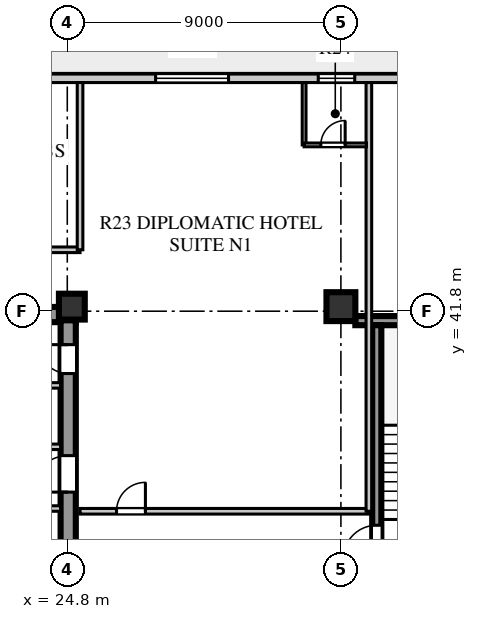
"""IFC4 building model, lengths in metres.
Left out: names, types, materials, properties, quantities, classifications, styles, units other than length and angle.
Written with IfcOpenShell. Run it as: python <this file> out.ifc"""

import sys

from ifc_helpers import new_model, si_unit, direction, frame, frame_2d, origin, origin_2d, place, context, subcontext, project, spatial, rectangle, extrude, element, fill, save


model = new_model("IFC4")
c1 = context("Model", 3, precision=1e-05, world=origin(), true_north=direction((0.0, 1.0)))
c2 = subcontext(c1, "Body", "Model", "MODEL_VIEW")
j1 = project(units=[si_unit("LENGTHUNIT", "METRE"), si_unit("PLANEANGLEUNIT", "RADIAN")], contexts=[c1])
p1 = place(None, origin())
s1 = spatial("IfcSite", under=j1, at=p1, CompositionType="ELEMENT")
p2 = place(p1, origin())
s2 = spatial("IfcBuilding", under=s1, at=p2, CompositionType="ELEMENT")
p3 = place(p2, frame((0.0, 0.0, 157.9)))
s3 = spatial("IfcBuildingStorey", under=s2, at=p3, CompositionType="ELEMENT", Elevation=157.9)
p4 = place(p3, frame((15.4, 41.69, 0.0), z_axis=(0.0, 0.0, 1.0), x_axis=(1.0, 0.0, 0.0)))
e1 = element("IfcWall", 1, at=p4, inside=s3, PredefinedType="SHEAR", context=c2, shape_type="SweptSolid", body=[
    extrude(rectangle(XDim=9.68, YDim=0.5, at=frame_2d((4.84, 0.0))), origin(), (0.0, 0.0, 1.0), 3.6),
])
p5 = place(p3, frame((24.83, 15.74, 0.0), z_axis=(0.0, 0.0, 1.0), x_axis=(0.0, 1.0, 0.0)))
e2 = element("IfcWall", 2, at=p5, inside=s3, PredefinedType="SHEAR", context=c2, shape_type="SweptSolid", body=[
    extrude(rectangle(XDim=25.76, YDim=0.5, at=frame_2d((12.88, 0.0))), origin(), (0.0, 0.0, 1.0), 3.6),
])
p6 = place(p5, frame((1.61, 0.0, 0.0)))
e3 = element("IfcOpeningElement", 3, at=p6, cuts=e2, PredefinedType="OPENING", context=c2, shape_type="SweptSolid", body=[
    extrude(rectangle(XDim=1.2, YDim=2.1, at=frame_2d((0.6, 1.05))), frame((0.0, 0.26, 0.0), z_axis=(0.0, -1.0, 0.0), x_axis=(1.0, 0.0, 0.0)), (0.0, 0.0, 1.0), 0.52),
])
p7 = place(p5, frame((6.78, 0.0, 0.0)))
e4 = element("IfcOpeningElement", 4, at=p7, cuts=e2, PredefinedType="OPENING", context=c2, shape_type="SweptSolid", body=[
    extrude(rectangle(XDim=0.85, YDim=2.06, at=frame_2d((0.425, 1.03))), frame((0.0, 0.26, 0.0), z_axis=(0.0, -1.0, 0.0), x_axis=(1.0, 0.0, 0.0)), (0.0, 0.0, 1.0), 0.52),
])
p8 = place(p5, frame((12.11, 0.0, 0.0)))
e5 = element("IfcOpeningElement", 5, at=p8, cuts=e2, PredefinedType="OPENING", context=c2, shape_type="SweptSolid", body=[
    extrude(rectangle(XDim=1.5, YDim=2.12, at=frame_2d((0.75, 1.06))), frame((0.0, 0.26, 0.0), z_axis=(0.0, -1.0, 0.0), x_axis=(1.0, 0.0, 0.0)), (0.0, 0.0, 1.0), 0.52),
])
p9 = place(p5, frame((20.11, 0.0, 0.0)))
e6 = element("IfcOpeningElement", 6, at=p9, cuts=e2, PredefinedType="OPENING", context=c2, shape_type="SweptSolid", body=[
    extrude(rectangle(XDim=1.2, YDim=2.12, at=frame_2d((0.6, 1.06))), frame((0.0, 0.26, 0.0), z_axis=(0.0, -1.0, 0.0), x_axis=(1.0, 0.0, 0.0)), (0.0, 0.0, 1.0), 0.52),
])
p10 = place(p5, frame((24.01, 0.0, 0.0)))
e7 = element("IfcOpeningElement", 7, at=p10, cuts=e2, PredefinedType="OPENING", context=c2, shape_type="SweptSolid", body=[
    extrude(rectangle(XDim=0.95, YDim=2.1, at=frame_2d((0.475, 1.05))), frame((0.0, 0.26, 0.0), z_axis=(0.0, -1.0, 0.0), x_axis=(1.0, 0.0, 0.0)), (0.0, 0.0, 1.0), 0.52),
])
p11 = place(p3, frame((34.275, 41.49, 0.0), z_axis=(0.0, 0.0, 1.0), x_axis=(1.0, 0.0, 0.0)))
e8 = element("IfcWall", 8, at=p11, inside=s3, PredefinedType="SHEAR", context=c2, shape_type="SweptSolid", body=[
    extrude(rectangle(XDim=4.595, YDim=0.3, at=frame_2d((2.298, 0.0))), origin(), (0.0, 0.0, 1.0), 3.6),
])
p12 = place(p3, frame((34.98, 33.31, 0.0), z_axis=(0.0, 0.0, 1.0), x_axis=(0.0, 1.0, 0.0)))
e9 = element("IfcWall", 9, at=p12, inside=s3, PredefinedType="SHEAR", context=c2, shape_type="SweptSolid", body=[
    extrude(rectangle(XDim=8.03, YDim=0.3, at=frame_2d((4.015, 0.0))), origin(), (0.0, 0.0, 1.0), 3.6),
])
p13 = place(p12, frame((0.35, 0.0, 0.0)))
e10 = element("IfcOpeningElement", 10, at=p13, cuts=e9, PredefinedType="OPENING", context=c2, shape_type="SweptSolid", body=[
    extrude(rectangle(XDim=1.1, YDim=2.1, at=frame_2d((0.55, 1.05))), frame((0.0, 0.16, 0.0), z_axis=(0.0, -1.0, 0.0), x_axis=(1.0, 0.0, 0.0)), (0.0, 0.0, 1.0), 0.32),
])
p14 = place(p3, frame((24.95, 41.95, 0.0), z_axis=(0.0, 0.0, 1.0), x_axis=(1.0, 0.0, 0.0)))
e11 = element("IfcColumn", 11, at=p14, inside=s3, PredefinedType="COLUMN", context=c2, shape_type="SweptSolid", body=[
    extrude(rectangle(XDim=0.85, YDim=0.85, at=origin_2d()), origin(), (0.0, 0.0, 1.0), 3.6),
])
p15 = place(p3, frame((33.8, 41.95, 0.0), z_axis=(0.0, 0.0, 1.0), x_axis=(1.0, 0.0, 0.0)))
e12 = element("IfcColumn", 12, at=p15, inside=s3, PredefinedType="COLUMN", context=c2, shape_type="SweptSolid", body=[
    extrude(rectangle(XDim=0.95, YDim=0.95, at=origin_2d()), origin(), (0.0, 0.0, 1.0), 3.6),
])
p16 = place(p3, frame((45.55, 49.46, 0.0), z_axis=(0.0, 0.0, 1.0), x_axis=(-1.0, 0.0, 0.0)))
e13 = element("IfcWall", 13, at=p16, inside=s3, PredefinedType="STANDARD", context=c2, shape_type="SweptSolid", body=[
    extrude(rectangle(XDim=32.5, YDim=0.28, at=frame_2d((16.25, 0.0))), origin(), (0.0, 0.0, 1.0), 3.6),
])
p17 = place(p16, frame((30.55, 0.0, 0.0)))
e14 = element("IfcOpeningElement", 14, at=p17, cuts=e13, PredefinedType="OPENING", context=c2, shape_type="SweptSolid", body=[
    extrude(rectangle(XDim=1.0, YDim=2.05, at=frame_2d((0.5, 1.025))), frame((0.0, 0.15, 0.0), z_axis=(0.0, -1.0, 0.0), x_axis=(1.0, 0.0, 0.0)), (0.0, 0.0, 1.0), 0.3),
])
p18 = place(p16, frame((24.87, 0.0, 0.8)))
e15 = element("IfcOpeningElement", 15, at=p18, cuts=e13, PredefinedType="OPENING", context=c2, shape_type="SweptSolid", body=[
    extrude(rectangle(XDim=1.2, YDim=1.75, at=frame_2d((0.6, 0.875))), frame((0.0, 0.15, 0.0), z_axis=(0.0, -1.0, 0.0), x_axis=(1.0, 0.0, 0.0)), (0.0, 0.0, 1.0), 0.3),
])
p19 = place(p16, frame((15.445, 0.0, 0.8)))
e16 = element("IfcOpeningElement", 16, at=p19, cuts=e13, PredefinedType="OPENING", context=c2, shape_type="SweptSolid", body=[
    extrude(rectangle(XDim=2.4, YDim=2.05, at=frame_2d((1.2, 1.025))), frame((0.0, 0.15, 0.0), z_axis=(0.0, -1.0, 0.0), x_axis=(1.0, 0.0, 0.0)), (0.0, 0.0, 1.0), 0.3),
])
p20 = place(p16, frame((11.295, 0.0, 0.8)))
e17 = element("IfcOpeningElement", 17, at=p20, cuts=e13, PredefinedType="OPENING", context=c2, shape_type="SweptSolid", body=[
    extrude(rectangle(XDim=1.2, YDim=1.75, at=frame_2d((0.6, 0.875))), frame((0.0, 0.15, 0.0), z_axis=(0.0, -1.0, 0.0), x_axis=(1.0, 0.0, 0.0)), (0.0, 0.0, 1.0), 0.3),
])
p21 = place(p16, frame((7.105, 0.0, 0.8)))
e18 = element("IfcOpeningElement", 18, at=p21, cuts=e13, PredefinedType="OPENING", context=c2, shape_type="SweptSolid", body=[
    extrude(rectangle(XDim=1.35, YDim=1.9, at=frame_2d((0.675, 0.95))), frame((0.0, 0.15, 0.0), z_axis=(0.0, -1.0, 0.0), x_axis=(1.0, 0.0, 0.0)), (0.0, 0.0, 1.0), 0.3),
])
p22 = place(p16, frame((1.595, 0.0, 0.8)))
e19 = element("IfcOpeningElement", 19, at=p22, cuts=e13, PredefinedType="OPENING", context=c2, shape_type="SweptSolid", body=[
    extrude(rectangle(XDim=1.65, YDim=1.95, at=frame_2d((0.825, 0.975))), frame((0.0, 0.15, 0.0), z_axis=(0.0, -1.0, 0.0), x_axis=(1.0, 0.0, 0.0)), (0.0, 0.0, 1.0), 0.3),
])
p23 = place(p3, frame((22.02, 35.31, 0.0), z_axis=(0.0, 0.0, 1.0), x_axis=(1.0, 0.0, 0.0)))
e20 = element("IfcWall", 20, at=p23, inside=s3, PredefinedType="SOLIDWALL", context=c2, shape_type="SweptSolid", body=[
    extrude(rectangle(XDim=2.56, YDim=0.18, at=frame_2d((1.28, 0.0))), origin(), (0.0, 0.0, 1.0), 3.6),
])
p24 = place(p23, frame((0.55, 0.0, 0.0)))
e21 = element("IfcOpeningElement", 21, at=p24, cuts=e20, PredefinedType="OPENING", context=c2, shape_type="SweptSolid", body=[
    extrude(rectangle(XDim=1.0, YDim=2.1, at=frame_2d((0.5, 1.05))), frame((0.0, 0.1, 0.0), z_axis=(0.0, -1.0, 0.0), x_axis=(1.0, 0.0, 0.0)), (0.0, 0.0, 1.0), 0.2),
])
p25 = place(p3, frame((19.64, 37.34, 0.0), z_axis=(0.0, 0.0, 1.0), x_axis=(1.0, 0.0, 0.0)))
e22 = element("IfcWall", 22, at=p25, inside=s3, PredefinedType="SOLIDWALL", context=c2, shape_type="SweptSolid", body=[
    extrude(rectangle(XDim=4.94, YDim=0.18, at=frame_2d((2.47, 0.0))), origin(), (0.0, 0.0, 1.0), 3.6),
])
p26 = place(p25, frame((0.45, 0.0, 0.0)))
e23 = element("IfcOpeningElement", 23, at=p26, cuts=e22, PredefinedType="OPENING", context=c2, shape_type="SweptSolid", body=[
    extrude(rectangle(XDim=1.0, YDim=2.1, at=frame_2d((0.5, 1.05))), frame((0.0, 0.1, 0.0), z_axis=(0.0, -1.0, 0.0), x_axis=(1.0, 0.0, 0.0)), (0.0, 0.0, 1.0), 0.2),
])
p27 = place(p25, frame((2.5, 0.0, 0.0)))
e24 = element("IfcOpeningElement", 24, at=p27, cuts=e22, PredefinedType="OPENING", context=c2, shape_type="SweptSolid", body=[
    extrude(rectangle(XDim=1.0, YDim=2.1, at=frame_2d((0.5, 1.05))), frame((0.0, 0.1, 0.0), z_axis=(0.0, -1.0, 0.0), x_axis=(1.0, 0.0, 0.0)), (0.0, 0.0, 1.0), 0.2),
])
p28 = place(p3, frame((19.64, 39.36, 0.0), z_axis=(0.0, 0.0, 1.0), x_axis=(1.0, 0.0, 0.0)))
e25 = element("IfcWall", 25, at=p28, inside=s3, PredefinedType="SOLIDWALL", context=c2, shape_type="SweptSolid", body=[
    extrude(rectangle(XDim=4.94, YDim=0.18, at=frame_2d((2.47, 0.0))), origin(), (0.0, 0.0, 1.0), 3.6),
])
p29 = place(p3, frame((25.22, 35.22, 0.0), z_axis=(0.0, 0.0, 1.0), x_axis=(1.0, 0.0, 0.0)))
e26 = element("IfcWall", 26, at=p29, inside=s3, PredefinedType="SOLIDWALL", context=c2, shape_type="SweptSolid", body=[
    extrude(rectangle(XDim=9.5, YDim=0.185, at=frame_2d((4.75, 0.0))), origin(), (0.0, 0.0, 1.0), 3.6),
])
p30 = place(p29, frame((1.2, 0.0, 0.0)))
e27 = element("IfcOpeningElement", 27, at=p30, cuts=e26, PredefinedType="OPENING", context=c2, shape_type="SweptSolid", body=[
    extrude(rectangle(XDim=0.95, YDim=2.1, at=frame_2d((0.475, 1.05))), frame((0.0, 0.103, 0.0), z_axis=(0.0, -1.0, 0.0), x_axis=(1.0, 0.0, 0.0)), (0.0, 0.0, 1.0), 0.205),
])
p31 = place(p3, frame((13.39, 43.82, 0.0), z_axis=(0.0, 0.0, 1.0), x_axis=(1.0, 0.0, 0.0)))
e28 = element("IfcWall", 28, at=p31, inside=s3, PredefinedType="SOLIDWALL", context=c2, shape_type="SweptSolid", body=[
    extrude(rectangle(XDim=11.83, YDim=0.185, at=frame_2d((5.915, 0.0))), origin(), (0.0, 0.0, 1.0), 3.6),
])
p32 = place(p31, frame((4.76, 0.0, 0.0)))
e29 = element("IfcOpeningElement", 29, at=p32, cuts=e28, PredefinedType="OPENING", context=c2, shape_type="SweptSolid", body=[
    extrude(rectangle(XDim=1.0, YDim=2.08, at=frame_2d((0.5, 1.04))), frame((0.0, 0.103, 0.0), z_axis=(0.0, -1.0, 0.0), x_axis=(1.0, 0.0, 0.0)), (0.0, 0.0, 1.0), 0.205),
])
p33 = place(p3, frame((25.22, 43.82, 0.0), z_axis=(0.0, 0.0, 1.0), x_axis=(0.0, 1.0, 0.0)))
e30 = element("IfcWall", 30, at=p33, inside=s3, PredefinedType="SOLIDWALL", context=c2, shape_type="SweptSolid", body=[
    extrude(rectangle(XDim=5.5, YDim=0.185, at=frame_2d((2.75, 0.0))), origin(), (0.0, 0.0, 1.0), 3.15),
])
p34 = place(p3, frame((34.72, 35.22, 0.0), z_axis=(0.0, 0.0, 1.0), x_axis=(0.0, 1.0, 0.0)))
e31 = element("IfcWall", 31, at=p34, inside=s3, PredefinedType="SOLIDWALL", context=c2, shape_type="SweptSolid", body=[
    extrude(rectangle(XDim=14.1, YDim=0.185, at=frame_2d((7.05, 0.0))), origin(), (0.0, 0.0, 1.0), 3.6),
])
p35 = place(p3, frame((32.59, 47.27, 0.0), z_axis=(0.0, 0.0, 1.0), x_axis=(0.0, 1.0, 0.0)))
e32 = element("IfcWall", 32, at=p35, inside=s3, PredefinedType="PLUMBINGWALL", context=c2, shape_type="SweptSolid", body=[
    extrude(rectangle(XDim=2.05, YDim=0.125, at=frame_2d((1.025, 0.0))), origin(), (0.0, 0.0, 1.0), 3.6),
])
p36 = place(p3, frame((32.59, 47.27, 0.0), z_axis=(0.0, 0.0, 1.0), x_axis=(1.0, 0.0, 0.0)))
e33 = element("IfcWall", 33, at=p36, inside=s3, PredefinedType="PLUMBINGWALL", context=c2, shape_type="SweptSolid", body=[
    extrude(rectangle(XDim=2.05, YDim=0.125, at=frame_2d((1.025, 0.0))), origin(), (0.0, 0.0, 1.0), 3.6),
])
p37 = place(p36, frame((0.55, 0.0, 0.0)))
e34 = element("IfcOpeningElement", 34, at=p37, cuts=e33, PredefinedType="OPENING", context=c2, shape_type="SweptSolid", body=[
    extrude(rectangle(XDim=0.8, YDim=2.05, at=frame_2d((0.4, 1.025))), frame((0.0, 0.073, 0.0), z_axis=(0.0, -1.0, 0.0), x_axis=(1.0, 0.0, 0.0)), (0.0, 0.0, 1.0), 0.145),
])
p38 = place(p19, origin())
e35 = element("IfcWindow", 35, at=p38, inside=s3, PartitioningType="SINGLE_PANEL", PredefinedType="WINDOW", context=c2, shape_type="SweptSolid", body=[
    extrude(rectangle(XDim=2.4, YDim=2.05, at=frame_2d((1.2, 1.025))), frame((0.0, 0.03, 0.0), z_axis=(0.0, -1.0, 0.0), x_axis=(1.0, 0.0, 0.0)), (0.0, 0.0, 1.0), 0.06),
])
fill(e16, e35)
p39 = place(p20, origin())
e36 = element("IfcWindow", 36, at=p39, inside=s3, PartitioningType="SINGLE_PANEL", PredefinedType="WINDOW", context=c2, shape_type="SweptSolid", body=[
    extrude(rectangle(XDim=1.2, YDim=1.75, at=frame_2d((0.6, 0.875))), frame((0.0, 0.03, 0.0), z_axis=(0.0, -1.0, 0.0), x_axis=(1.0, 0.0, 0.0)), (0.0, 0.0, 1.0), 0.06),
])
fill(e17, e36)
p40 = place(p9, frame((1.2, 0.0, 0.0), z_axis=(0.0, 0.0, 1.0), x_axis=(-1.0, 0.0, 0.0)))
e37 = element("IfcDoor", 37, at=p40, inside=s3, OperationType="SINGLE_SWING_RIGHT", PredefinedType="DOOR", context=c2, shape_type="SweptSolid", body=[
    extrude(rectangle(XDim=1.2, YDim=2.12, at=frame_2d((0.6, 1.06))), frame((0.0, 0.025, 0.0), z_axis=(0.0, -1.0, 0.0), x_axis=(1.0, 0.0, 0.0)), (0.0, 0.0, 1.0), 0.05),
])
fill(e6, e37)
p41 = place(p10, frame((0.95, 0.0, 0.0), z_axis=(0.0, 0.0, 1.0), x_axis=(-1.0, 0.0, 0.0)))
e38 = element("IfcDoor", 38, at=p41, inside=s3, OperationType="SINGLE_SWING_LEFT", PredefinedType="DOOR", context=c2, shape_type="SweptSolid", body=[
    extrude(rectangle(XDim=0.95, YDim=2.1, at=frame_2d((0.475, 1.05))), frame((0.0, 0.025, 0.0), z_axis=(0.0, -1.0, 0.0), x_axis=(1.0, 0.0, 0.0)), (0.0, 0.0, 1.0), 0.05),
])
fill(e7, e38)
p42 = place(p13, origin())
e39 = element("IfcDoor", 39, at=p42, inside=s3, OperationType="SINGLE_SWING_LEFT", PredefinedType="DOOR", context=c2, shape_type="SweptSolid", body=[
    extrude(rectangle(XDim=1.1, YDim=2.1, at=frame_2d((0.55, 1.05))), frame((0.0, 0.025, 0.0), z_axis=(0.0, -1.0, 0.0), x_axis=(1.0, 0.0, 0.0)), (0.0, 0.0, 1.0), 0.05),
])
fill(e10, e39)
p43 = place(p30, origin())
e40 = element("IfcDoor", 40, at=p43, inside=s3, OperationType="SINGLE_SWING_RIGHT", PredefinedType="DOOR", context=c2, shape_type="SweptSolid", body=[
    extrude(rectangle(XDim=0.95, YDim=2.1, at=frame_2d((0.475, 1.05))), frame((0.0, 0.025, 0.0), z_axis=(0.0, -1.0, 0.0), x_axis=(1.0, 0.0, 0.0)), (0.0, 0.0, 1.0), 0.05),
])
fill(e27, e40)
p44 = place(p37, frame((0.8, 0.0, 0.0), z_axis=(0.0, 0.0, 1.0), x_axis=(-1.0, 0.0, 0.0)))
e41 = element("IfcDoor", 41, at=p44, inside=s3, OperationType="SINGLE_SWING_LEFT", PredefinedType="DOOR", context=c2, shape_type="SweptSolid", body=[
    extrude(rectangle(XDim=0.8, YDim=2.05, at=frame_2d((0.4, 1.025))), frame((0.0, 0.025, 0.0), z_axis=(0.0, -1.0, 0.0), x_axis=(1.0, 0.0, 0.0)), (0.0, 0.0, 1.0), 0.05),
])
fill(e34, e41)
save(model, sys.argv[1])
